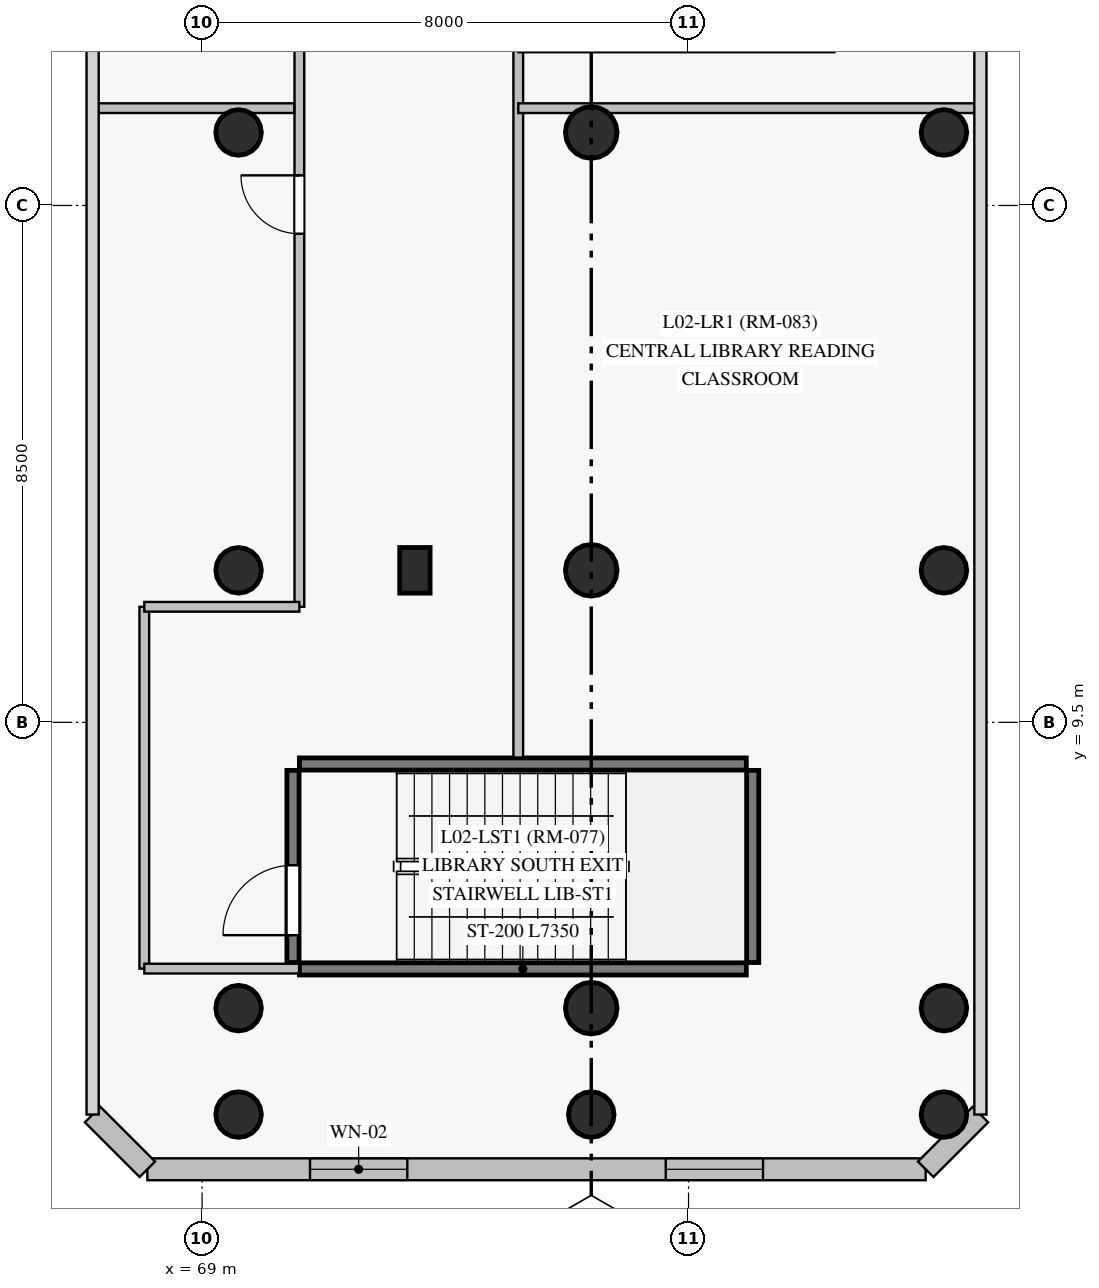
"""IFC4 building model, lengths in metres.
Left out: names, types, materials, properties, quantities, classifications, styles, units other than length and angle.
Written with IfcOpenShell. Run it as: python <this file> out.ifc"""

import sys

from ifc_helpers import new_model, si_unit, direction, frame, frame_2d, origin, origin_with_axes, origin_2d, place, context, subcontext, project, spatial, rectangle, circle, extrude, source, transform, mapped, element, fill, save


model = new_model("IFC4")
c1 = context("Model", 3, precision=1e-05, world=origin(), true_north=direction((0.0, 1.0)))
c2 = subcontext(c1, "Body", "Model", "MODEL_VIEW")
j1 = project(units=[si_unit("LENGTHUNIT", "METRE"), si_unit("PLANEANGLEUNIT", "RADIAN")], contexts=[c1])
p1 = place(None, origin())
s1 = spatial("IfcSite", under=j1, at=p1, CompositionType="ELEMENT")
p2 = place(p1, origin())
s2 = spatial("IfcBuilding", under=s1, at=p2, CompositionType="ELEMENT")
p3 = place(p2, frame((0.0, 0.0, 9.0)))
s3 = spatial("IfcBuildingStorey", under=s2, at=p3, CompositionType="ELEMENT", Elevation=9.0)
m1 = source(origin_with_axes(), c2, "Body", "SweptSolid", [
    extrude(circle(Radius=0.375, at=origin_2d()), origin(), (0.0, 0.0, 1.0), 4.5),
])
for number, where, z_axis, x_axis in (
    (1, (69.6, 3.05, 0.0), (0.0, 0.0, 1.0), (1.0, 0.0, 0.0)),
    (2, (75.4, 3.05, 0.0), (0.0, 0.0, 1.0), (1.0, 0.0, 0.0)),
    (3, (81.2, 3.05, 0.0), (0.0, 0.0, 1.0), (1.0, 0.0, 0.0)),
    (4, (69.6, 4.8, 0.0), (0.0, 0.0, 1.0), (1.0, 0.0, 0.0)),
    (5, (69.6, 12.0, 0.0), (0.0, 0.0, 1.0), (1.0, 0.0, 0.0)),
    (6, (69.6, 19.2, 0.0), (0.0, 0.0, 1.0), (1.0, 0.0, 0.0)),
):
    element("IfcColumn", number, at=place(p3, frame(where, z_axis=z_axis, x_axis=x_axis)), inside=s3, PredefinedType="COLUMN", context=c2, shape_type="MappedRepresentation", body=[
        mapped(m1, transform((0.0, 0.0, 0.0), scale=1.0)),
    ])
m2 = source(origin_with_axes(), c2, "Body", "SweptSolid", [
    extrude(circle(Radius=0.425, at=origin_2d()), origin(), (0.0, 0.0, 1.0), 4.5),
])
for number, where, z_axis, x_axis in (
    (7, (75.4, 4.8, 0.0), (0.0, 0.0, 1.0), (1.0, 0.0, 0.0)),
    (8, (75.4, 12.0, 0.0), (0.0, 0.0, 1.0), (1.0, 0.0, 0.0)),
    (9, (75.4, 19.2, 0.0), (0.0, 0.0, 1.0), (1.0, 0.0, 0.0)),
):
    element("IfcColumn", number, at=place(p3, frame(where, z_axis=z_axis, x_axis=x_axis)), inside=s3, PredefinedType="COLUMN", context=c2, shape_type="MappedRepresentation", body=[
        mapped(m2, transform((0.0, 0.0, 0.0), scale=1.0)),
    ])
for number, where, z_axis, x_axis in (
    (10, (81.2, 4.8, 0.0), (0.0, 0.0, 1.0), (1.0, 0.0, 0.0)),
    (11, (81.2, 12.0, 0.0), (0.0, 0.0, 1.0), (1.0, 0.0, 0.0)),
    (12, (81.2, 19.2, 0.0), (0.0, 0.0, 1.0), (1.0, 0.0, 0.0)),
):
    element("IfcColumn", number, at=place(p3, frame(where, z_axis=z_axis, x_axis=x_axis)), inside=s3, PredefinedType="COLUMN", context=c2, shape_type="MappedRepresentation", body=[
        mapped(m1, transform((0.0, 0.0, 0.0), scale=1.0)),
    ])
m3 = source(origin_with_axes(), c2, "Body", "SweptSolid", [
    extrude(rectangle(XDim=0.5, YDim=0.75, at=origin_2d()), origin(), (0.0, 0.0, 1.0), 4.5),
])
p4 = place(p3, frame((72.5, 12.0, 0.0), z_axis=(0.0, 0.0, 1.0), x_axis=(1.0, 0.0, 0.0)))
e13 = element("IfcColumn", 13, at=p4, inside=s3, PredefinedType="PILASTER", context=c2, shape_type="MappedRepresentation", body=[
    mapped(m3, transform((0.0, 0.0, 0.0), scale=1.0)),
])
p5 = place(p3, frame((68.1, 2.15, 0.0), z_axis=(0.0, 0.0, 1.0), x_axis=(1.0, 0.0, 0.0)))
e14 = element("IfcWall", 14, at=p5, inside=s3, PredefinedType="SOLIDWALL", context=c2, shape_type="SweptSolid", body=[
    extrude(rectangle(XDim=12.8, YDim=0.36, at=frame_2d((6.4, 0.0))), origin(), (0.0, 0.0, 1.0), 4.2),
])
p6 = place(p5, frame((2.675, 0.0, 0.85)))
e15 = element("IfcOpeningElement", 15, at=p6, cuts=e14, PredefinedType="OPENING", context=c2, shape_type="SweptSolid", body=[
    extrude(rectangle(XDim=1.6, YDim=2.2, at=frame_2d((0.8, 1.1))), frame((0.0, 0.19, 0.0), z_axis=(0.0, -1.0, 0.0), x_axis=(1.0, 0.0, 0.0)), (0.0, 0.0, 1.0), 0.38),
])
p7 = place(p5, frame((8.525, 0.0, 0.85)))
e16 = element("IfcOpeningElement", 16, at=p7, cuts=e14, PredefinedType="OPENING", context=c2, shape_type="SweptSolid", body=[
    extrude(rectangle(XDim=1.6, YDim=2.2, at=frame_2d((0.8, 1.1))), frame((0.0, 0.19, 0.0), z_axis=(0.0, -1.0, 0.0), x_axis=(1.0, 0.0, 0.0)), (0.0, 0.0, 1.0), 0.38),
])
for number, where, z_axis, x_axis in (
    (17, (80.9, 2.15, 0.0), (0.0, 0.0, 1.0), (0.707, 0.707, 0.0)),
    (18, (67.2, 3.05, 0.0), (0.0, 0.0, 1.0), (0.707, -0.707, 0.0)),
):
    element("IfcWall", number, at=place(p3, frame(where, z_axis=z_axis, x_axis=x_axis)), inside=s3, PredefinedType="SOLIDWALL", context=c2, shape_type="SweptSolid", body=[
        extrude(rectangle(XDim=1.273, YDim=0.36, at=frame_2d((0.636, 0.0))), origin(), (0.0, 0.0, 1.0), 4.2),
    ])
for number, where, z_axis, x_axis in (
    (19, (70.6, 5.445, 0.0), (0.0, 0.0, 1.0), (1.0, 0.0, 0.0)),
    (20, (70.6, 8.815, 0.0), (0.0, 0.0, 1.0), (1.0, 0.0, 0.0)),
):
    element("IfcWall", number, at=place(p3, frame(where, z_axis=z_axis, x_axis=x_axis)), inside=s3, PredefinedType="SHEAR", context=c2, shape_type="SweptSolid", body=[
        extrude(rectangle(XDim=7.35, YDim=0.2, at=frame_2d((3.675, 0.0))), origin(), (0.0, 0.0, 1.0), 4.2),
    ])
p8 = place(p3, frame((70.495, 5.55, 0.0), z_axis=(0.0, 0.0, 1.0), x_axis=(0.0, 1.0, 0.0)))
e21 = element("IfcWall", 21, at=p8, inside=s3, PredefinedType="SHEAR", context=c2, shape_type="SweptSolid", body=[
    extrude(rectangle(XDim=3.16, YDim=0.2, at=frame_2d((1.58, 0.0))), origin(), (0.0, 0.0, 1.0), 4.2),
])
p9 = place(p8, frame((0.45, 0.0, 0.0)))
e22 = element("IfcOpeningElement", 22, at=p9, cuts=e21, PredefinedType="OPENING", context=c2, shape_type="SweptSolid", body=[
    extrude(rectangle(XDim=1.15, YDim=2.15, at=frame_2d((0.575, 1.075))), frame((0.0, 0.11, 0.0), z_axis=(0.0, -1.0, 0.0), x_axis=(1.0, 0.0, 0.0)), (0.0, 0.0, 1.0), 0.22),
])
p10 = place(p3, frame((78.055, 5.55, 0.0), z_axis=(0.0, 0.0, 1.0), x_axis=(0.0, 1.0, 0.0)))
e23 = element("IfcWall", 23, at=p10, inside=s3, PredefinedType="SHEAR", context=c2, shape_type="SweptSolid", body=[
    extrude(rectangle(XDim=3.16, YDim=0.2, at=frame_2d((1.58, 0.0))), origin(), (0.0, 0.0, 1.0), 4.2),
])
p11 = place(p3, frame((70.6, 11.4, 0.0), z_axis=(0.0, 0.0, 1.0), x_axis=(0.0, 1.0, 0.0)))
e24 = element("IfcWall", 24, at=p11, inside=s3, PredefinedType="PARTITIONING", context=c2, shape_type="SweptSolid", body=[
    extrude(rectangle(XDim=30.2, YDim=0.16, at=frame_2d((15.1, 0.0))), origin(), (0.0, 0.0, 1.0), 4.2),
])
p12 = place(p11, frame((6.135, 0.0, 0.0)))
e25 = element("IfcOpeningElement", 25, at=p12, cuts=e24, PredefinedType="OPENING", context=c2, shape_type="SweptSolid", body=[
    extrude(rectangle(XDim=0.96, YDim=2.15, at=frame_2d((0.48, 1.075))), frame((0.0, 0.09, 0.0), z_axis=(0.0, -1.0, 0.0), x_axis=(1.0, 0.0, 0.0)), (0.0, 0.0, 1.0), 0.18),
])
p13 = place(p3, frame((74.2, 20.6, 0.0), z_axis=(0.0, 0.0, 1.0), x_axis=(0.0, -1.0, 0.0)))
e26 = element("IfcWall", 26, at=p13, inside=s3, PredefinedType="PARTITIONING", context=c2, shape_type="SweptSolid", body=[
    extrude(rectangle(XDim=11.678, YDim=0.16, at=frame_2d((5.839, 0.0))), origin(), (0.0, 0.0, 1.0), 4.2),
])
p14 = place(p3, frame((74.2, 19.6, 0.0), z_axis=(0.0, 0.0, 1.0), x_axis=(1.0, 0.0, 0.0)))
e27 = element("IfcWall", 27, at=p14, inside=s3, PredefinedType="PARTITIONING", context=c2, shape_type="SweptSolid", body=[
    extrude(rectangle(XDim=7.545, YDim=0.16, at=frame_2d((3.772, 0.0))), origin(), (0.0, 0.0, 1.0), 3.55),
])
p15 = place(p3, frame((68.05, 5.45, 0.0), z_axis=(0.0, 0.0, 1.0), x_axis=(0.0, 1.0, 0.0)))
e28 = element("IfcWall", 28, at=p15, inside=s3, PredefinedType="PARTITIONING", context=c2, shape_type="SweptSolid", body=[
    extrude(rectangle(XDim=5.95, YDim=0.16, at=frame_2d((2.975, 0.0))), origin(), (0.0, 0.0, 1.0), 4.2),
])
p16 = place(p3, frame((67.255, 19.6, 0.0), z_axis=(0.0, 0.0, 1.0), x_axis=(1.0, 0.0, 0.0)))
e29 = element("IfcWall", 29, at=p16, inside=s3, PredefinedType="PARTITIONING", context=c2, shape_type="SweptSolid", body=[
    extrude(rectangle(XDim=3.26, YDim=0.16, at=frame_2d((1.63, 0.0))), origin(), (0.0, 0.0, 1.0), 3.55),
])
p17 = place(p3, frame((68.05, 11.4, 0.0), z_axis=(0.0, 0.0, 1.0), x_axis=(1.0, 0.0, 0.0)))
e30 = element("IfcWall", 30, at=p17, inside=s3, PredefinedType="PARTITIONING", context=c2, shape_type="SweptSolid", body=[
    extrude(rectangle(XDim=2.55, YDim=0.16, at=frame_2d((1.275, 0.0))), origin(), (0.0, 0.0, 1.0), 3.55),
])
p18 = place(p3, frame((70.595, 5.45, 0.0), z_axis=(0.0, 0.0, 1.0), x_axis=(-1.0, 0.0, 0.0)))
e31 = element("IfcWall", 31, at=p18, inside=s3, PredefinedType="PARTITIONING", context=c2, shape_type="SweptSolid", body=[
    extrude(rectangle(XDim=2.545, YDim=0.16, at=frame_2d((1.272, 0.0))), origin(), (0.0, 0.0, 1.0), 3.55),
])
m4 = source(origin_with_axes(), c2, "Body", "SweptSolid", [
    extrude(rectangle(XDim=1.6, YDim=2.2, at=frame_2d((0.8, 1.1))), frame((0.0, 0.03, 0.0), z_axis=(0.0, -1.0, 0.0), x_axis=(1.0, 0.0, 0.0)), (0.0, 0.0, 1.0), 0.06),
])
p19 = place(p6, origin())
e32 = element("IfcWindow", 32, at=p19, inside=s3, PartitioningType="SINGLE_PANEL", PredefinedType="WINDOW", context=c2, shape_type="MappedRepresentation", body=[
    mapped(m4, transform((0.0, 0.0, 0.0), scale=1.0)),
])
fill(e15, e32)
p20 = place(p7, origin())
e33 = element("IfcWindow", 33, at=p20, inside=s3, PartitioningType="SINGLE_PANEL", PredefinedType="WINDOW", context=c2, shape_type="MappedRepresentation", body=[
    mapped(m4, transform((0.0, 0.0, 0.0), scale=1.0)),
])
fill(e16, e33)
m5 = source(origin_with_axes(), c2, "Body", "SweptSolid", [
    extrude(rectangle(XDim=1.15, YDim=2.15, at=frame_2d((0.575, 1.075))), frame((0.0, 0.025, 0.0), z_axis=(0.0, -1.0, 0.0), x_axis=(1.0, 0.0, 0.0)), (0.0, 0.0, 1.0), 0.05),
])
p21 = place(p9, origin())
e34 = element("IfcDoor", 34, at=p21, inside=s3, OperationType="SINGLE_SWING_LEFT", PredefinedType="DOOR", context=c2, shape_type="MappedRepresentation", body=[
    mapped(m5, transform((0.0, 0.0, 0.0), scale=1.0)),
])
fill(e22, e34)
m6 = source(origin_with_axes(), c2, "Body", "SweptSolid", [
    extrude(rectangle(XDim=0.96, YDim=2.15, at=frame_2d((0.48, 1.075))), frame((0.0, 0.025, 0.0), z_axis=(0.0, -1.0, 0.0), x_axis=(1.0, 0.0, 0.0)), (0.0, 0.0, 1.0), 0.05),
])
p22 = place(p12, origin())
e35 = element("IfcDoor", 35, at=p22, inside=s3, OperationType="SINGLE_SWING_RIGHT", PredefinedType="DOOR", context=c2, shape_type="MappedRepresentation", body=[
    mapped(m6, transform((0.0, 0.0, 0.0), scale=1.0)),
])
fill(e25, e35)
save(model, sys.argv[1])
